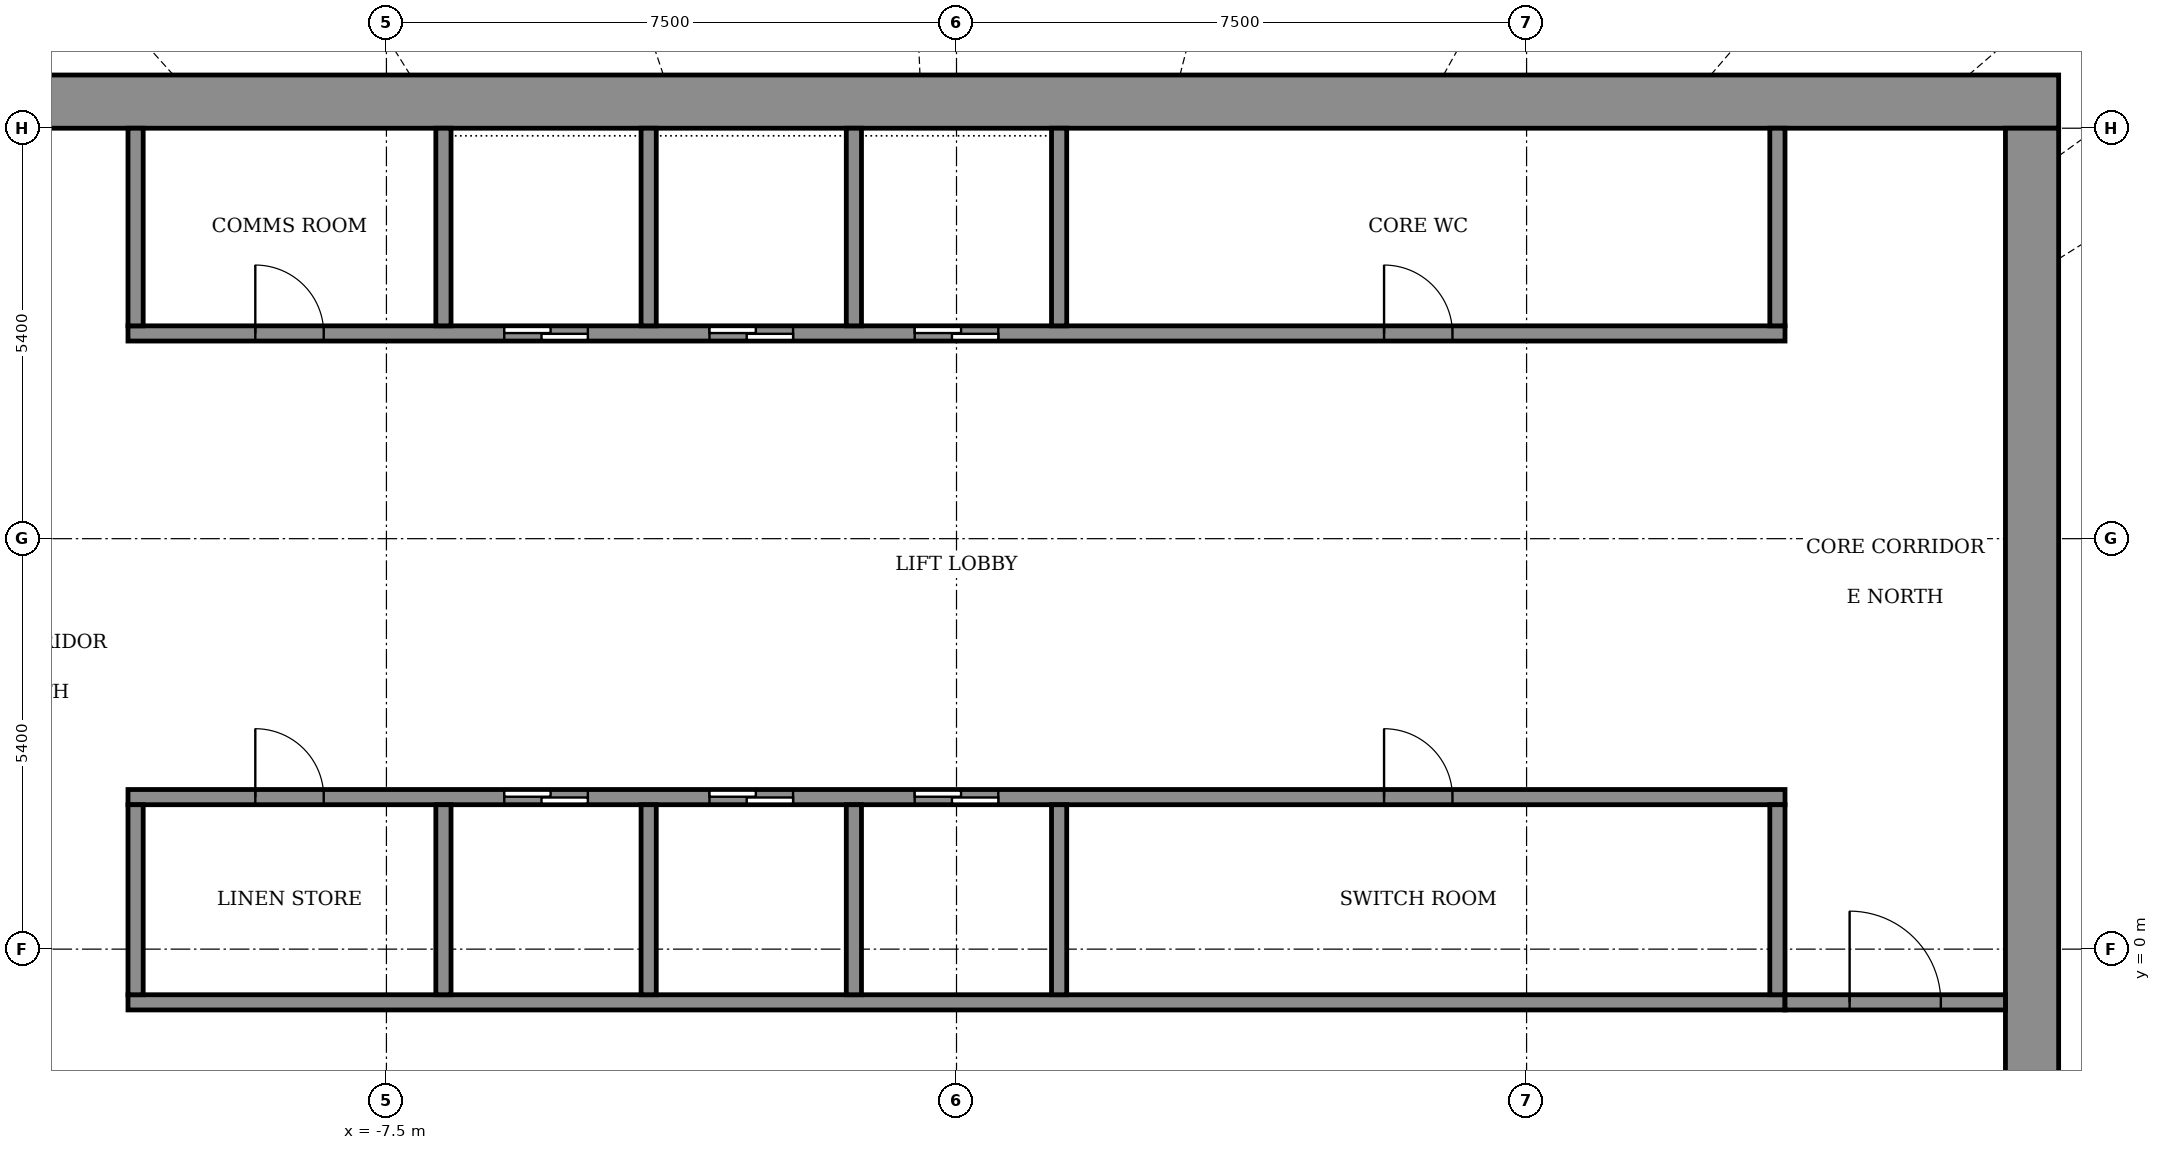
"""IFC4 building model, lengths in metres.
Left out: names, types, materials, properties, quantities, classifications, styles, units other than length and angle.
Written with IfcOpenShell. Run it as: python <this file> out.ifc"""

import sys

from ifc_helpers import new_model, si_unit, direction, frame, frame_2d, origin, place, context, subcontext, project, spatial, rectangle, extrude, element, fill, save


model = new_model("IFC4")
c1 = context("Model", 3, precision=1e-05, world=origin(), true_north=direction((0.0, 1.0)))
c2 = subcontext(c1, "Body", "Model", "MODEL_VIEW")
j1 = project(units=[si_unit("LENGTHUNIT", "METRE"), si_unit("PLANEANGLEUNIT", "RADIAN")], contexts=[c1])
p1 = place(None, origin())
s1 = spatial("IfcSite", under=j1, at=p1, CompositionType="ELEMENT")
p2 = place(p1, origin())
s2 = spatial("IfcBuilding", under=s1, at=p2, CompositionType="ELEMENT")
p3 = place(p2, frame((0.0, 0.0, 252.7)))
s3 = spatial("IfcBuildingStorey", under=s2, at=p3, CompositionType="ELEMENT", Elevation=252.7)
p4 = place(p3, frame((-14.5, 11.15, 0.0), z_axis=(0.0, 0.0, 1.0), x_axis=(1.0, 0.0, 0.0)))
e1 = element("IfcWall", 1, at=p4, inside=s3, PredefinedType="SHEAR", context=c2, shape_type="SweptSolid", body=[
    extrude(rectangle(XDim=29.0, YDim=0.7, at=frame_2d((14.5, 0.0))), origin(), (0.0, 0.0, 1.0), 4.6),
])
p5 = place(p3, frame((14.15, -10.8, 0.0), z_axis=(0.0, 0.0, 1.0), x_axis=(0.0, 1.0, 0.0)))
e2 = element("IfcWall", 2, at=p5, inside=s3, PredefinedType="SHEAR", context=c2, shape_type="SweptSolid", body=[
    extrude(rectangle(XDim=21.6, YDim=0.7, at=frame_2d((10.8, 0.0))), origin(), (0.0, 0.0, 1.0), 4.6),
])
p6 = place(p5, frame((1.2, 0.0, 0.0)))
e3 = element("IfcOpeningElement", 3, at=p6, cuts=e2, PredefinedType="OPENING", context=c2, shape_type="SweptSolid", body=[
    extrude(rectangle(XDim=1.2, YDim=2.1, at=frame_2d((0.6, 1.05))), frame((0.0, 0.36, 0.0), z_axis=(0.0, -1.0, 0.0), x_axis=(1.0, 0.0, 0.0)), (0.0, 0.0, 1.0), 0.72),
])
p7 = place(p3, frame((-10.9, -0.7, 0.0), z_axis=(0.0, 0.0, 1.0), x_axis=(1.0, 0.0, 0.0)))
e4 = element("IfcWall", 4, at=p7, inside=s3, PredefinedType="SHEAR", context=c2, shape_type="SweptSolid", body=[
    extrude(rectangle(XDim=21.8, YDim=0.2, at=frame_2d((10.9, 0.0))), origin(), (0.0, 0.0, 1.0), 4.05),
])
p8 = place(p3, frame((-10.9, 2.0, 0.0), z_axis=(0.0, 0.0, 1.0), x_axis=(1.0, 0.0, 0.0)))
e5 = element("IfcWall", 5, at=p8, inside=s3, PredefinedType="SHEAR", context=c2, shape_type="SweptSolid", body=[
    extrude(rectangle(XDim=21.8, YDim=0.2, at=frame_2d((10.9, 0.0))), origin(), (0.0, 0.0, 1.0), 4.05),
])
p9 = place(p8, frame((4.95, 0.0, 0.0)))
e6 = element("IfcOpeningElement", 6, at=p9, cuts=e5, PredefinedType="OPENING", context=c2, shape_type="SweptSolid", body=[
    extrude(rectangle(XDim=1.1, YDim=2.1, at=frame_2d((0.55, 1.05))), frame((0.0, 0.11, 0.0), z_axis=(0.0, -1.0, 0.0), x_axis=(1.0, 0.0, 0.0)), (0.0, 0.0, 1.0), 0.22),
])
p10 = place(p8, frame((7.65, 0.0, 0.0)))
e7 = element("IfcOpeningElement", 7, at=p10, cuts=e5, PredefinedType="OPENING", context=c2, shape_type="SweptSolid", body=[
    extrude(rectangle(XDim=1.1, YDim=2.1, at=frame_2d((0.55, 1.05))), frame((0.0, 0.11, 0.0), z_axis=(0.0, -1.0, 0.0), x_axis=(1.0, 0.0, 0.0)), (0.0, 0.0, 1.0), 0.22),
])
p11 = place(p8, frame((10.35, 0.0, 0.0)))
e8 = element("IfcOpeningElement", 8, at=p11, cuts=e5, PredefinedType="OPENING", context=c2, shape_type="SweptSolid", body=[
    extrude(rectangle(XDim=1.1, YDim=2.1, at=frame_2d((0.55, 1.05))), frame((0.0, 0.11, 0.0), z_axis=(0.0, -1.0, 0.0), x_axis=(1.0, 0.0, 0.0)), (0.0, 0.0, 1.0), 0.22),
])
p12 = place(p8, frame((1.675, 0.0, 0.0)))
e9 = element("IfcOpeningElement", 9, at=p12, cuts=e5, PredefinedType="OPENING", context=c2, shape_type="SweptSolid", body=[
    extrude(rectangle(XDim=0.9, YDim=2.1, at=frame_2d((0.45, 1.05))), frame((0.0, 0.11, 0.0), z_axis=(0.0, -1.0, 0.0), x_axis=(1.0, 0.0, 0.0)), (0.0, 0.0, 1.0), 0.22),
])
p13 = place(p8, frame((16.525, 0.0, 0.0)))
e10 = element("IfcOpeningElement", 10, at=p13, cuts=e5, PredefinedType="OPENING", context=c2, shape_type="SweptSolid", body=[
    extrude(rectangle(XDim=0.9, YDim=2.1, at=frame_2d((0.45, 1.05))), frame((0.0, 0.11, 0.0), z_axis=(0.0, -1.0, 0.0), x_axis=(1.0, 0.0, 0.0)), (0.0, 0.0, 1.0), 0.22),
])
p14 = place(p3, frame((-10.9, 8.1, 0.0), z_axis=(0.0, 0.0, 1.0), x_axis=(1.0, 0.0, 0.0)))
e11 = element("IfcWall", 11, at=p14, inside=s3, PredefinedType="SHEAR", context=c2, shape_type="SweptSolid", body=[
    extrude(rectangle(XDim=21.8, YDim=0.2, at=frame_2d((10.9, 0.0))), origin(), (0.0, 0.0, 1.0), 4.05),
])
p15 = place(p14, frame((4.95, 0.0, 0.0)))
e12 = element("IfcOpeningElement", 12, at=p15, cuts=e11, PredefinedType="OPENING", context=c2, shape_type="SweptSolid", body=[
    extrude(rectangle(XDim=1.1, YDim=2.1, at=frame_2d((0.55, 1.05))), frame((0.0, 0.11, 0.0), z_axis=(0.0, -1.0, 0.0), x_axis=(1.0, 0.0, 0.0)), (0.0, 0.0, 1.0), 0.22),
])
p16 = place(p14, frame((7.65, 0.0, 0.0)))
e13 = element("IfcOpeningElement", 13, at=p16, cuts=e11, PredefinedType="OPENING", context=c2, shape_type="SweptSolid", body=[
    extrude(rectangle(XDim=1.1, YDim=2.1, at=frame_2d((0.55, 1.05))), frame((0.0, 0.11, 0.0), z_axis=(0.0, -1.0, 0.0), x_axis=(1.0, 0.0, 0.0)), (0.0, 0.0, 1.0), 0.22),
])
p17 = place(p14, frame((10.35, 0.0, 0.0)))
e14 = element("IfcOpeningElement", 14, at=p17, cuts=e11, PredefinedType="OPENING", context=c2, shape_type="SweptSolid", body=[
    extrude(rectangle(XDim=1.1, YDim=2.1, at=frame_2d((0.55, 1.05))), frame((0.0, 0.11, 0.0), z_axis=(0.0, -1.0, 0.0), x_axis=(1.0, 0.0, 0.0)), (0.0, 0.0, 1.0), 0.22),
])
p18 = place(p14, frame((1.675, 0.0, 0.0)))
e15 = element("IfcOpeningElement", 15, at=p18, cuts=e11, PredefinedType="OPENING", context=c2, shape_type="SweptSolid", body=[
    extrude(rectangle(XDim=0.9, YDim=2.1, at=frame_2d((0.45, 1.05))), frame((0.0, 0.11, 0.0), z_axis=(0.0, -1.0, 0.0), x_axis=(1.0, 0.0, 0.0)), (0.0, 0.0, 1.0), 0.22),
])
p19 = place(p14, frame((16.525, 0.0, 0.0)))
e16 = element("IfcOpeningElement", 16, at=p19, cuts=e11, PredefinedType="OPENING", context=c2, shape_type="SweptSolid", body=[
    extrude(rectangle(XDim=0.9, YDim=2.1, at=frame_2d((0.45, 1.05))), frame((0.0, 0.11, 0.0), z_axis=(0.0, -1.0, 0.0), x_axis=(1.0, 0.0, 0.0)), (0.0, 0.0, 1.0), 0.22),
])
p20 = place(p3, frame((-10.8, -0.6, 0.0), z_axis=(0.0, 0.0, 1.0), x_axis=(0.0, 1.0, 0.0)))
e17 = element("IfcWall", 17, at=p20, inside=s3, PredefinedType="STANDARD", context=c2, shape_type="SweptSolid", body=[
    extrude(rectangle(XDim=2.5, YDim=0.2, at=frame_2d((1.25, 0.0))), origin(), (0.0, 0.0, 1.0), 4.05),
])
for number, where, z_axis, x_axis in (
    (18, (-6.75, -0.6, 0.0), (0.0, 0.0, 1.0), (0.0, 1.0, 0.0)),
    (19, (-4.05, -0.6, 0.0), (0.0, 0.0, 1.0), (0.0, 1.0, 0.0)),
    (20, (-1.35, -0.6, 0.0), (0.0, 0.0, 1.0), (0.0, 1.0, 0.0)),
    (21, (1.35, -0.6, 0.0), (0.0, 0.0, 1.0), (0.0, 1.0, 0.0)),
):
    element("IfcWall", number, at=place(p3, frame(where, z_axis=z_axis, x_axis=x_axis)), inside=s3, PredefinedType="SHEAR", context=c2, shape_type="SweptSolid", body=[
        extrude(rectangle(XDim=2.5, YDim=0.2, at=frame_2d((1.25, 0.0))), origin(), (0.0, 0.0, 1.0), 4.05),
    ])
p21 = place(p3, frame((10.8, -0.6, 0.0), z_axis=(0.0, 0.0, 1.0), x_axis=(0.0, 1.0, 0.0)))
e22 = element("IfcWall", 22, at=p21, inside=s3, PredefinedType="STANDARD", context=c2, shape_type="SweptSolid", body=[
    extrude(rectangle(XDim=2.5, YDim=0.2, at=frame_2d((1.25, 0.0))), origin(), (0.0, 0.0, 1.0), 4.05),
])
p22 = place(p3, frame((-10.8, 8.2, 0.0), z_axis=(0.0, 0.0, 1.0), x_axis=(0.0, 1.0, 0.0)))
e23 = element("IfcWall", 23, at=p22, inside=s3, PredefinedType="STANDARD", context=c2, shape_type="SweptSolid", body=[
    extrude(rectangle(XDim=2.6, YDim=0.2, at=frame_2d((1.3, 0.0))), origin(), (0.0, 0.0, 1.0), 4.05),
])
for number, where, z_axis, x_axis in (
    (24, (-6.75, 8.2, 0.0), (0.0, 0.0, 1.0), (0.0, 1.0, 0.0)),
    (25, (-4.05, 8.2, 0.0), (0.0, 0.0, 1.0), (0.0, 1.0, 0.0)),
    (26, (-1.35, 8.2, 0.0), (0.0, 0.0, 1.0), (0.0, 1.0, 0.0)),
    (27, (1.35, 8.2, 0.0), (0.0, 0.0, 1.0), (0.0, 1.0, 0.0)),
):
    element("IfcWall", number, at=place(p3, frame(where, z_axis=z_axis, x_axis=x_axis)), inside=s3, PredefinedType="SHEAR", context=c2, shape_type="SweptSolid", body=[
        extrude(rectangle(XDim=2.6, YDim=0.2, at=frame_2d((1.3, 0.0))), origin(), (0.0, 0.0, 1.0), 4.05),
    ])
p23 = place(p3, frame((10.8, 8.2, 0.0), z_axis=(0.0, 0.0, 1.0), x_axis=(0.0, 1.0, 0.0)))
e28 = element("IfcWall", 28, at=p23, inside=s3, PredefinedType="STANDARD", context=c2, shape_type="SweptSolid", body=[
    extrude(rectangle(XDim=2.6, YDim=0.2, at=frame_2d((1.3, 0.0))), origin(), (0.0, 0.0, 1.0), 4.05),
])
p24 = place(p3, frame((10.9, -0.7, 0.0), z_axis=(0.0, 0.0, 1.0), x_axis=(1.0, 0.0, 0.0)))
e29 = element("IfcWall", 29, at=p24, inside=s3, PredefinedType="STANDARD", context=c2, shape_type="SweptSolid", body=[
    extrude(rectangle(XDim=2.9, YDim=0.2, at=frame_2d((1.45, 0.0))), origin(), (0.0, 0.0, 1.0), 4.05),
])
p25 = place(p24, frame((0.85, 0.0, 0.0)))
e30 = element("IfcOpeningElement", 30, at=p25, cuts=e29, PredefinedType="OPENING", context=c2, shape_type="SweptSolid", body=[
    extrude(rectangle(XDim=1.2, YDim=2.1, at=frame_2d((0.6, 1.05))), frame((0.0, 0.11, 0.0), z_axis=(0.0, -1.0, 0.0), x_axis=(1.0, 0.0, 0.0)), (0.0, 0.0, 1.0), 0.22),
])
p26 = place(p9, origin())
e31 = element("IfcDoor", 31, at=p26, inside=s3, OperationType="SLIDING_TO_LEFT", PredefinedType="DOOR", context=c2, shape_type="SweptSolid", body=[
    extrude(rectangle(XDim=1.1, YDim=2.1, at=frame_2d((0.55, 1.05))), frame((0.0, 0.025, 0.0), z_axis=(0.0, -1.0, 0.0), x_axis=(1.0, 0.0, 0.0)), (0.0, 0.0, 1.0), 0.05),
])
fill(e6, e31)
p27 = place(p10, origin())
e32 = element("IfcDoor", 32, at=p27, inside=s3, OperationType="SLIDING_TO_LEFT", PredefinedType="DOOR", context=c2, shape_type="SweptSolid", body=[
    extrude(rectangle(XDim=1.1, YDim=2.1, at=frame_2d((0.55, 1.05))), frame((0.0, 0.025, 0.0), z_axis=(0.0, -1.0, 0.0), x_axis=(1.0, 0.0, 0.0)), (0.0, 0.0, 1.0), 0.05),
])
fill(e7, e32)
p28 = place(p11, origin())
e33 = element("IfcDoor", 33, at=p28, inside=s3, OperationType="SLIDING_TO_LEFT", PredefinedType="DOOR", context=c2, shape_type="SweptSolid", body=[
    extrude(rectangle(XDim=1.1, YDim=2.1, at=frame_2d((0.55, 1.05))), frame((0.0, 0.025, 0.0), z_axis=(0.0, -1.0, 0.0), x_axis=(1.0, 0.0, 0.0)), (0.0, 0.0, 1.0), 0.05),
])
fill(e8, e33)
p29 = place(p15, origin())
e34 = element("IfcDoor", 34, at=p29, inside=s3, OperationType="SLIDING_TO_LEFT", PredefinedType="DOOR", context=c2, shape_type="SweptSolid", body=[
    extrude(rectangle(XDim=1.1, YDim=2.1, at=frame_2d((0.55, 1.05))), frame((0.0, 0.025, 0.0), z_axis=(0.0, -1.0, 0.0), x_axis=(1.0, 0.0, 0.0)), (0.0, 0.0, 1.0), 0.05),
])
fill(e12, e34)
p30 = place(p16, origin())
e35 = element("IfcDoor", 35, at=p30, inside=s3, OperationType="SLIDING_TO_LEFT", PredefinedType="DOOR", context=c2, shape_type="SweptSolid", body=[
    extrude(rectangle(XDim=1.1, YDim=2.1, at=frame_2d((0.55, 1.05))), frame((0.0, 0.025, 0.0), z_axis=(0.0, -1.0, 0.0), x_axis=(1.0, 0.0, 0.0)), (0.0, 0.0, 1.0), 0.05),
])
fill(e13, e35)
p31 = place(p17, origin())
e36 = element("IfcDoor", 36, at=p31, inside=s3, OperationType="SLIDING_TO_LEFT", PredefinedType="DOOR", context=c2, shape_type="SweptSolid", body=[
    extrude(rectangle(XDim=1.1, YDim=2.1, at=frame_2d((0.55, 1.05))), frame((0.0, 0.025, 0.0), z_axis=(0.0, -1.0, 0.0), x_axis=(1.0, 0.0, 0.0)), (0.0, 0.0, 1.0), 0.05),
])
fill(e14, e36)
p32 = place(p12, origin())
e37 = element("IfcDoor", 37, at=p32, inside=s3, OperationType="SINGLE_SWING_RIGHT", PredefinedType="DOOR", context=c2, shape_type="SweptSolid", body=[
    extrude(rectangle(XDim=0.9, YDim=2.1, at=frame_2d((0.45, 1.05))), frame((0.0, 0.025, 0.0), z_axis=(0.0, -1.0, 0.0), x_axis=(1.0, 0.0, 0.0)), (0.0, 0.0, 1.0), 0.05),
])
fill(e9, e37)
p33 = place(p13, origin())
e38 = element("IfcDoor", 38, at=p33, inside=s3, OperationType="SINGLE_SWING_LEFT", PredefinedType="DOOR", context=c2, shape_type="SweptSolid", body=[
    extrude(rectangle(XDim=0.9, YDim=2.1, at=frame_2d((0.45, 1.05))), frame((0.0, 0.025, 0.0), z_axis=(0.0, -1.0, 0.0), x_axis=(1.0, 0.0, 0.0)), (0.0, 0.0, 1.0), 0.05),
])
fill(e10, e38)
p34 = place(p18, origin())
e39 = element("IfcDoor", 39, at=p34, inside=s3, OperationType="SINGLE_SWING_LEFT", PredefinedType="DOOR", context=c2, shape_type="SweptSolid", body=[
    extrude(rectangle(XDim=0.9, YDim=2.1, at=frame_2d((0.45, 1.05))), frame((0.0, 0.025, 0.0), z_axis=(0.0, -1.0, 0.0), x_axis=(1.0, 0.0, 0.0)), (0.0, 0.0, 1.0), 0.05),
])
fill(e15, e39)
p35 = place(p19, origin())
e40 = element("IfcDoor", 40, at=p35, inside=s3, OperationType="SINGLE_SWING_RIGHT", PredefinedType="DOOR", context=c2, shape_type="SweptSolid", body=[
    extrude(rectangle(XDim=0.9, YDim=2.1, at=frame_2d((0.45, 1.05))), frame((0.0, 0.025, 0.0), z_axis=(0.0, -1.0, 0.0), x_axis=(1.0, 0.0, 0.0)), (0.0, 0.0, 1.0), 0.05),
])
fill(e16, e40)
p36 = place(p25, origin())
e41 = element("IfcDoor", 41, at=p36, inside=s3, OperationType="SINGLE_SWING_LEFT", PredefinedType="DOOR", context=c2, shape_type="SweptSolid", body=[
    extrude(rectangle(XDim=1.2, YDim=2.1, at=frame_2d((0.6, 1.05))), frame((0.0, 0.025, 0.0), z_axis=(0.0, -1.0, 0.0), x_axis=(1.0, 0.0, 0.0)), (0.0, 0.0, 1.0), 0.05),
])
fill(e30, e41)
save(model, sys.argv[1])
